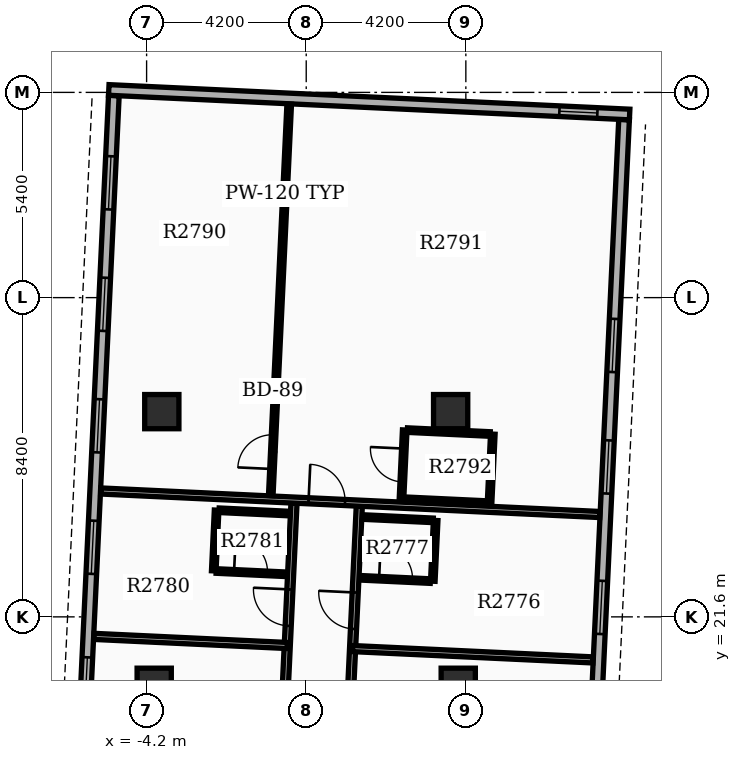
"""IFC4 building model, lengths in metres.
Left out: names, types, materials, properties, quantities, classifications, styles, units other than length and angle.
Written with IfcOpenShell. Run it as: python <this file> out.ifc"""

import sys

from ifc_helpers import new_model, si_unit, direction, frame, frame_2d, origin, origin_2d, place, context, subcontext, project, spatial, rectangle, extrude, element, fill, save


model = new_model("IFC4")
c1 = context("Model", 3, precision=1e-05, world=origin(), true_north=direction((0.0, 1.0)))
c2 = subcontext(c1, "Body", "Model", "MODEL_VIEW")
j1 = project(units=[si_unit("LENGTHUNIT", "METRE"), si_unit("PLANEANGLEUNIT", "RADIAN")], contexts=[c1])
p1 = place(None, origin())
s1 = spatial("IfcSite", under=j1, at=p1, CompositionType="ELEMENT")
p2 = place(p1, origin())
s2 = spatial("IfcBuilding", under=s1, at=p2, CompositionType="ELEMENT")
p3 = place(p2, frame((0.0, 0.0, 172.2)))
s3 = spatial("IfcBuildingStorey", under=s2, at=p3, CompositionType="ELEMENT", Elevation=172.2)
for number, where, z_axis, x_axis in (
    (1, (-4.0, 19.8, 0.0), (0.0, 0.0, 1.0), (1.0, 0.0, 0.0)),
    (2, (4.0, 19.8, 0.0), (0.0, 0.0, 1.0), (1.0, 0.0, 0.0)),
    (3, (-3.8, 27.0, 0.0), (0.0, 0.0, 1.0), (1.0, 0.0, 0.0)),
    (4, (3.8, 27.0, 0.0), (0.0, 0.0, 1.0), (1.0, 0.0, 0.0)),
):
    element("IfcColumn", number, at=place(p3, frame(where, z_axis=z_axis, x_axis=x_axis)), inside=s3, PredefinedType="COLUMN", context=c2, shape_type="SweptSolid", body=[
        extrude(rectangle(XDim=0.9, YDim=0.9, at=origin_2d()), origin(), (0.0, 0.0, 1.0), 3.9),
    ])
p4 = place(p3, frame((7.416, 14.607, 0.0), z_axis=(0.0, 0.0, 1.0), x_axis=(0.047103473814, 0.998890015344, 0.0)))
e5 = element("IfcWall", 5, at=p4, inside=s3, PredefinedType="STANDARD", context=c2, shape_type="SweptSolid", body=[
    extrude(rectangle(XDim=20.1, YDim=0.28, at=frame_2d((10.05, 0.0))), origin(), (0.0, 0.0, 1.0), 2.97),
])
p5 = place(p4, frame((1.6, 0.0, 0.8)))
e6 = element("IfcOpeningElement", 6, at=p5, cuts=e5, PredefinedType="OPENING", context=c2, shape_type="SweptSolid", body=[
    extrude(rectangle(XDim=1.4, YDim=1.6, at=frame_2d((0.7, 0.8))), frame((0.0, 0.15, 0.0), z_axis=(0.0, -1.0, 0.0), x_axis=(1.0, 0.0, 0.0)), (0.0, 0.0, 1.0), 0.3),
])
p6 = place(p4, frame((6.55, 0.0, 0.8)))
e7 = element("IfcOpeningElement", 7, at=p6, cuts=e5, PredefinedType="OPENING", context=c2, shape_type="SweptSolid", body=[
    extrude(rectangle(XDim=1.4, YDim=1.6, at=frame_2d((0.7, 0.8))), frame((0.0, 0.15, 0.0), z_axis=(0.0, -1.0, 0.0), x_axis=(1.0, 0.0, 0.0)), (0.0, 0.0, 1.0), 0.3),
])
p7 = place(p4, frame((10.25, 0.0, 0.8)))
e8 = element("IfcOpeningElement", 8, at=p7, cuts=e5, PredefinedType="OPENING", context=c2, shape_type="SweptSolid", body=[
    extrude(rectangle(XDim=1.4, YDim=1.6, at=frame_2d((0.7, 0.8))), frame((0.0, 0.15, 0.0), z_axis=(0.0, -1.0, 0.0), x_axis=(1.0, 0.0, 0.0)), (0.0, 0.0, 1.0), 0.3),
])
p8 = place(p4, frame((13.45, 0.0, 0.8)))
e9 = element("IfcOpeningElement", 9, at=p8, cuts=e5, PredefinedType="OPENING", context=c2, shape_type="SweptSolid", body=[
    extrude(rectangle(XDim=1.4, YDim=1.6, at=frame_2d((0.7, 0.8))), frame((0.0, 0.15, 0.0), z_axis=(0.0, -1.0, 0.0), x_axis=(1.0, 0.0, 0.0)), (0.0, 0.0, 1.0), 0.3),
])
p9 = place(p3, frame((-5.062, 35.318, 0.0), z_axis=(0.0, 0.0, 1.0), x_axis=(-0.047103473814, -0.998890015344, 0.0)))
e10 = element("IfcWall", 10, at=p9, inside=s3, PredefinedType="STANDARD", context=c2, shape_type="SweptSolid", body=[
    extrude(rectangle(XDim=20.1, YDim=0.28, at=frame_2d((10.05, 0.0))), origin(), (0.0, 0.0, 1.0), 2.97),
])
p10 = place(p9, frame((1.6, 0.0, 0.8)))
e11 = element("IfcOpeningElement", 11, at=p10, cuts=e10, PredefinedType="OPENING", context=c2, shape_type="SweptSolid", body=[
    extrude(rectangle(XDim=1.4, YDim=1.6, at=frame_2d((0.7, 0.8))), frame((0.0, 0.15, 0.0), z_axis=(0.0, -1.0, 0.0), x_axis=(1.0, 0.0, 0.0)), (0.0, 0.0, 1.0), 0.3),
])
p11 = place(p9, frame((4.8, 0.0, 0.8)))
e12 = element("IfcOpeningElement", 12, at=p11, cuts=e10, PredefinedType="OPENING", context=c2, shape_type="SweptSolid", body=[
    extrude(rectangle(XDim=1.4, YDim=1.6, at=frame_2d((0.7, 0.8))), frame((0.0, 0.15, 0.0), z_axis=(0.0, -1.0, 0.0), x_axis=(1.0, 0.0, 0.0)), (0.0, 0.0, 1.0), 0.3),
])
p12 = place(p9, frame((8.0, 0.0, 0.8)))
e13 = element("IfcOpeningElement", 13, at=p12, cuts=e10, PredefinedType="OPENING", context=c2, shape_type="SweptSolid", body=[
    extrude(rectangle(XDim=1.4, YDim=1.6, at=frame_2d((0.7, 0.8))), frame((0.0, 0.15, 0.0), z_axis=(0.0, -1.0, 0.0), x_axis=(1.0, 0.0, 0.0)), (0.0, 0.0, 1.0), 0.3),
])
p13 = place(p9, frame((11.2, 0.0, 0.8)))
e14 = element("IfcOpeningElement", 14, at=p13, cuts=e10, PredefinedType="OPENING", context=c2, shape_type="SweptSolid", body=[
    extrude(rectangle(XDim=1.4, YDim=1.6, at=frame_2d((0.7, 0.8))), frame((0.0, 0.15, 0.0), z_axis=(0.0, -1.0, 0.0), x_axis=(1.0, 0.0, 0.0)), (0.0, 0.0, 1.0), 0.3),
])
p14 = place(p9, frame((14.799, 0.0, 0.85)))
e15 = element("IfcOpeningElement", 15, at=p14, cuts=e10, PredefinedType="OPENING", context=c2, shape_type="SweptSolid", body=[
    extrude(rectangle(XDim=1.2, YDim=1.6, at=frame_2d((0.6, 0.8))), frame((0.0, 0.15, 0.0), z_axis=(0.0, -1.0, 0.0), x_axis=(1.0, 0.0, 0.0)), (0.0, 0.0, 1.0), 0.3),
])
p15 = place(p3, frame((8.51, 34.818, 0.0), z_axis=(0.0, 0.0, 1.0), x_axis=(-0.998890092147, 0.047101845086, 0.0)))
e16 = element("IfcWall", 16, at=p15, inside=s3, PredefinedType="STANDARD", context=c2, shape_type="SweptSolid", body=[
    extrude(rectangle(XDim=13.72, YDim=0.28, at=frame_2d((6.86, 0.0))), origin(), (0.0, 0.0, 1.0), 2.97),
])
p16 = place(p15, frame((0.85, 0.0, 0.85)))
e17 = element("IfcOpeningElement", 17, at=p16, cuts=e16, PredefinedType="OPENING", context=c2, shape_type="SweptSolid", body=[
    extrude(rectangle(XDim=1.0, YDim=1.5, at=frame_2d((0.5, 0.75))), frame((0.0, 0.15, 0.0), z_axis=(0.0, -1.0, 0.0), x_axis=(1.0, 0.0, 0.0)), (0.0, 0.0, 1.0), 0.3),
])
p17 = place(p3, frame((0.939, 14.822, 0.0), z_axis=(0.0, 0.0, 1.0), x_axis=(0.047116711769, 0.99888939101, 0.0)))
e18 = element("IfcWall", 18, at=p17, inside=s3, PredefinedType="PARTITIONING", context=c2, shape_type="SweptSolid", body=[
    extrude(rectangle(XDim=9.7, YDim=0.16, at=frame_2d((4.85, 0.0))), origin(), (0.0, 0.0, 1.0), 2.96),
])
p18 = place(p17, frame((2.575, 0.0, 0.0)))
e19 = element("IfcOpeningElement", 19, at=p18, cuts=e18, PredefinedType="OPENING", context=c2, shape_type="SweptSolid", body=[
    extrude(rectangle(XDim=0.96, YDim=2.15, at=frame_2d((0.48, 1.075))), frame((0.0, 0.09, 0.0), z_axis=(0.0, -1.0, 0.0), x_axis=(1.0, 0.0, 0.0)), (0.0, 0.0, 1.0), 0.18),
])
p19 = place(p17, frame((6.467, 0.0, 0.0)))
e20 = element("IfcOpeningElement", 20, at=p19, cuts=e18, PredefinedType="OPENING", context=c2, shape_type="SweptSolid", body=[
    extrude(rectangle(XDim=0.96, YDim=2.15, at=frame_2d((0.48, 1.075))), frame((0.0, 0.09, 0.0), z_axis=(0.0, -1.0, 0.0), x_axis=(1.0, 0.0, 0.0)), (0.0, 0.0, 1.0), 0.18),
])
p20 = place(p3, frame((1.219, 20.766, 0.0), z_axis=(0.0, 0.0, 1.0), x_axis=(0.998889408842, -0.047116333717, 0.0)))
e21 = element("IfcWall", 21, at=p20, inside=s3, PredefinedType="PARTITIONING", context=c2, shape_type="SweptSolid", body=[
    extrude(rectangle(XDim=6.332, YDim=0.16, at=frame_2d((3.166, 0.0))), origin(), (0.0, 0.0, 1.0), 2.96),
])
p21 = place(p3, frame((1.448, 22.627, 0.0), z_axis=(0.0, 0.0, 1.0), x_axis=(0.998890786574, -0.047087116047, 0.0)))
e22 = element("IfcWall", 22, at=p21, inside=s3, PredefinedType="PARTITIONING", context=c2, shape_type="SweptSolid", body=[
    extrude(rectangle(XDim=1.82, YDim=0.12, at=frame_2d((0.91, 0.0))), origin(), (0.0, 0.0, 1.0), 2.96),
])
p22 = place(p21, frame((0.47, 0.0, 0.0)))
e23 = element("IfcOpeningElement", 23, at=p22, cuts=e22, PredefinedType="OPENING", context=c2, shape_type="SweptSolid", body=[
    extrude(rectangle(XDim=0.88, YDim=2.1, at=frame_2d((0.44, 1.05))), frame((0.0, 0.07, 0.0), z_axis=(0.0, -1.0, 0.0), x_axis=(1.0, 0.0, 0.0)), (0.0, 0.0, 1.0), 0.14),
])
p23 = place(p3, frame((1.523, 24.225, 0.0), z_axis=(0.0, 0.0, 1.0), x_axis=(0.998890786574, -0.047087116047, 0.0)))
e24 = element("IfcWall", 24, at=p23, inside=s3, PredefinedType="PARTITIONING", context=c2, shape_type="SweptSolid", body=[
    extrude(rectangle(XDim=1.82, YDim=0.12, at=frame_2d((0.91, 0.0))), origin(), (0.0, 0.0, 1.0), 2.96),
])
p24 = place(p3, frame((3.33, 22.538, 0.0), z_axis=(0.0, 0.0, 1.0), x_axis=(0.047144709581, 0.998888069985, 0.0)))
e25 = element("IfcWall", 25, at=p24, inside=s3, PredefinedType="PARTITIONING", context=c2, shape_type="SweptSolid", body=[
    extrude(rectangle(XDim=1.6, YDim=0.12, at=frame_2d((0.8, 0.0))), origin(), (0.0, 0.0, 1.0), 2.96),
])
p25 = place(p3, frame((-0.779, 14.903, 0.0), z_axis=(0.0, 0.0, 1.0), x_axis=(0.047091598416, 0.998890575268, 0.0)))
e26 = element("IfcWall", 26, at=p25, inside=s3, PredefinedType="PARTITIONING", context=c2, shape_type="SweptSolid", body=[
    extrude(rectangle(XDim=9.7, YDim=0.16, at=frame_2d((4.85, 0.0))), origin(), (0.0, 0.0, 1.0), 2.96),
])
p26 = place(p25, frame((2.575, 0.0, 0.0)))
e27 = element("IfcOpeningElement", 27, at=p26, cuts=e26, PredefinedType="OPENING", context=c2, shape_type="SweptSolid", body=[
    extrude(rectangle(XDim=0.96, YDim=2.15, at=frame_2d((0.48, 1.075))), frame((0.0, 0.09, 0.0), z_axis=(0.0, -1.0, 0.0), x_axis=(1.0, 0.0, 0.0)), (0.0, 0.0, 1.0), 0.18),
])
p27 = place(p25, frame((6.467, 0.0, 0.0)))
e28 = element("IfcOpeningElement", 28, at=p27, cuts=e26, PredefinedType="OPENING", context=c2, shape_type="SweptSolid", body=[
    extrude(rectangle(XDim=0.96, YDim=2.15, at=frame_2d((0.48, 1.075))), frame((0.0, 0.09, 0.0), z_axis=(0.0, -1.0, 0.0), x_axis=(1.0, 0.0, 0.0)), (0.0, 0.0, 1.0), 0.18),
])
p28 = place(p3, frame((-0.499, 20.847, 0.0), z_axis=(0.0, 0.0, 1.0), x_axis=(-0.998891017342, 0.047082220362, 0.0)))
e29 = element("IfcWall", 29, at=p28, inside=s3, PredefinedType="PARTITIONING", context=c2, shape_type="SweptSolid", body=[
    extrude(rectangle(XDim=5.092, YDim=0.16, at=frame_2d((2.546, 0.0))), origin(), (0.0, 0.0, 1.0), 2.96),
])
p29 = place(p3, frame((-2.368, 22.807, 0.0), z_axis=(0.0, 0.0, 1.0), x_axis=(0.998891083954, -0.047080807099, 0.0)))
e30 = element("IfcWall", 30, at=p29, inside=s3, PredefinedType="PARTITIONING", context=c2, shape_type="SweptSolid", body=[
    extrude(rectangle(XDim=1.82, YDim=0.12, at=frame_2d((0.91, 0.0))), origin(), (0.0, 0.0, 1.0), 2.96),
])
p30 = place(p29, frame((0.47, 0.0, 0.0)))
e31 = element("IfcOpeningElement", 31, at=p30, cuts=e30, PredefinedType="OPENING", context=c2, shape_type="SweptSolid", body=[
    extrude(rectangle(XDim=0.88, YDim=2.1, at=frame_2d((0.44, 1.05))), frame((0.0, 0.07, 0.0), z_axis=(0.0, -1.0, 0.0), x_axis=(1.0, 0.0, 0.0)), (0.0, 0.0, 1.0), 0.14),
])
p31 = place(p3, frame((-2.293, 24.405, 0.0), z_axis=(0.0, 0.0, 1.0), x_axis=(0.998891083954, -0.047080807099, 0.0)))
e32 = element("IfcWall", 32, at=p31, inside=s3, PredefinedType="PARTITIONING", context=c2, shape_type="SweptSolid", body=[
    extrude(rectangle(XDim=1.82, YDim=0.12, at=frame_2d((0.91, 0.0))), origin(), (0.0, 0.0, 1.0), 2.96),
])
p32 = place(p3, frame((-2.433, 22.81, 0.0), z_axis=(0.0, 0.0, 1.0), x_axis=(0.046992475174, 0.998895243395, 0.0)))
e33 = element("IfcWall", 33, at=p32, inside=s3, PredefinedType="PARTITIONING", context=c2, shape_type="SweptSolid", body=[
    extrude(rectangle(XDim=1.6, YDim=0.12, at=frame_2d((0.8, 0.0))), origin(), (0.0, 0.0, 1.0), 2.96),
])
p33 = place(p3, frame((-5.405, 24.912, 0.0), z_axis=(0.0, 0.0, 1.0), x_axis=(0.998889967692, -0.047104484326, 0.0)))
e34 = element("IfcWall", 34, at=p33, inside=s3, PredefinedType="PARTITIONING", context=c2, shape_type="SweptSolid", body=[
    extrude(rectangle(XDim=13.144, YDim=0.16, at=frame_2d((6.572, 0.0))), origin(), (0.0, 0.0, 1.0), 2.96),
])
p34 = place(p33, frame((5.472, 0.0, 0.0)))
e35 = element("IfcOpeningElement", 35, at=p34, cuts=e34, PredefinedType="OPENING", context=c2, shape_type="SweptSolid", body=[
    extrude(rectangle(XDim=0.96, YDim=2.15, at=frame_2d((0.48, 1.075))), frame((0.0, 0.09, 0.0), z_axis=(0.0, -1.0, 0.0), x_axis=(1.0, 0.0, 0.0)), (0.0, 0.0, 1.0), 0.18),
])
p35 = place(p3, frame((-0.933, 24.792, 0.0), z_axis=(0.0, 0.0, 1.0), x_axis=(0.047090456762, 0.998890629089, 0.0)))
e36 = element("IfcWall", 36, at=p35, inside=s3, PredefinedType="PARTITIONING", context=c2, shape_type="SweptSolid", body=[
    extrude(rectangle(XDim=10.312, YDim=0.12, at=frame_2d((5.156, 0.0))), origin(), (0.0, 0.0, 1.0), 2.96),
])
p36 = place(p35, frame((0.7, 0.0, 0.0)))
e37 = element("IfcOpeningElement", 37, at=p36, cuts=e36, PredefinedType="OPENING", context=c2, shape_type="SweptSolid", body=[
    extrude(rectangle(XDim=0.9, YDim=2.1, at=frame_2d((0.45, 1.05))), frame((0.0, 0.07, 0.0), z_axis=(0.0, -1.0, 0.0), x_axis=(1.0, 0.0, 0.0)), (0.0, 0.0, 1.0), 0.14),
])
p37 = place(p3, frame((2.506, 24.699, 0.0), z_axis=(0.0, 0.0, 1.0), x_axis=(0.047087116047, 0.998890786574, 0.0)))
e38 = element("IfcWall", 38, at=p37, inside=s3, PredefinedType="PARTITIONING", context=c2, shape_type="SweptSolid", body=[
    extrude(rectangle(XDim=1.82, YDim=0.12, at=frame_2d((0.91, 0.0))), origin(), (0.0, 0.0, 1.0), 2.96),
])
p38 = place(p37, frame((0.45, 0.0, 0.0)))
e39 = element("IfcOpeningElement", 39, at=p38, cuts=e38, PredefinedType="OPENING", context=c2, shape_type="SweptSolid", body=[
    extrude(rectangle(XDim=0.88, YDim=2.1, at=frame_2d((0.44, 1.05))), frame((0.0, 0.07, 0.0), z_axis=(0.0, -1.0, 0.0), x_axis=(1.0, 0.0, 0.0)), (0.0, 0.0, 1.0), 0.14),
])
p39 = place(p3, frame((4.824, 24.59, 0.0), z_axis=(0.0, 0.0, 1.0), x_axis=(0.047087116047, 0.998890786574, 0.0)))
e40 = element("IfcWall", 40, at=p39, inside=s3, PredefinedType="PARTITIONING", context=c2, shape_type="SweptSolid", body=[
    extrude(rectangle(XDim=1.82, YDim=0.12, at=frame_2d((0.91, 0.0))), origin(), (0.0, 0.0, 1.0), 2.96),
])
for number, where, z_axis, x_axis in (
    (41, (2.576, 24.696, 0.0), (0.0, 0.0, 1.0), (0.999, -0.047, 0.0)),
    (42, (2.662, 26.514, 0.0), (0.0, 0.0, 1.0), (0.999, -0.047, 0.0)),
):
    element("IfcWall", number, at=place(p3, frame(where, z_axis=z_axis, x_axis=x_axis)), inside=s3, PredefinedType="PARTITIONING", context=c2, shape_type="SweptSolid", body=[
        extrude(rectangle(XDim=2.18, YDim=0.12, at=frame_2d((1.09, 0.0))), origin(), (0.0, 0.0, 1.0), 2.96),
    ])
p40 = place(p6, origin())
e43 = element("IfcWindow", 43, at=p40, inside=s3, PartitioningType="SINGLE_PANEL", PredefinedType="WINDOW", context=c2, shape_type="SweptSolid", body=[
    extrude(rectangle(XDim=1.4, YDim=1.6, at=frame_2d((0.7, 0.8))), frame((0.0, 0.03, 0.0), z_axis=(0.0, -1.0, 0.0), x_axis=(1.0, 0.0, 0.0)), (0.0, 0.0, 1.0), 0.06),
])
fill(e7, e43)
p41 = place(p7, origin())
e44 = element("IfcWindow", 44, at=p41, inside=s3, PartitioningType="SINGLE_PANEL", PredefinedType="WINDOW", context=c2, shape_type="SweptSolid", body=[
    extrude(rectangle(XDim=1.4, YDim=1.6, at=frame_2d((0.7, 0.8))), frame((0.0, 0.03, 0.0), z_axis=(0.0, -1.0, 0.0), x_axis=(1.0, 0.0, 0.0)), (0.0, 0.0, 1.0), 0.06),
])
fill(e8, e44)
p42 = place(p8, origin())
e45 = element("IfcWindow", 45, at=p42, inside=s3, PartitioningType="SINGLE_PANEL", PredefinedType="WINDOW", context=c2, shape_type="SweptSolid", body=[
    extrude(rectangle(XDim=1.4, YDim=1.6, at=frame_2d((0.7, 0.8))), frame((0.0, 0.03, 0.0), z_axis=(0.0, -1.0, 0.0), x_axis=(1.0, 0.0, 0.0)), (0.0, 0.0, 1.0), 0.06),
])
fill(e9, e45)
p43 = place(p10, origin())
e46 = element("IfcWindow", 46, at=p43, inside=s3, PartitioningType="SINGLE_PANEL", PredefinedType="WINDOW", context=c2, shape_type="SweptSolid", body=[
    extrude(rectangle(XDim=1.4, YDim=1.6, at=frame_2d((0.7, 0.8))), frame((0.0, 0.03, 0.0), z_axis=(0.0, -1.0, 0.0), x_axis=(1.0, 0.0, 0.0)), (0.0, 0.0, 1.0), 0.06),
])
fill(e11, e46)
p44 = place(p11, origin())
e47 = element("IfcWindow", 47, at=p44, inside=s3, PartitioningType="SINGLE_PANEL", PredefinedType="WINDOW", context=c2, shape_type="SweptSolid", body=[
    extrude(rectangle(XDim=1.4, YDim=1.6, at=frame_2d((0.7, 0.8))), frame((0.0, 0.03, 0.0), z_axis=(0.0, -1.0, 0.0), x_axis=(1.0, 0.0, 0.0)), (0.0, 0.0, 1.0), 0.06),
])
fill(e12, e47)
p45 = place(p12, origin())
e48 = element("IfcWindow", 48, at=p45, inside=s3, PartitioningType="SINGLE_PANEL", PredefinedType="WINDOW", context=c2, shape_type="SweptSolid", body=[
    extrude(rectangle(XDim=1.4, YDim=1.6, at=frame_2d((0.7, 0.8))), frame((0.0, 0.03, 0.0), z_axis=(0.0, -1.0, 0.0), x_axis=(1.0, 0.0, 0.0)), (0.0, 0.0, 1.0), 0.06),
])
fill(e13, e48)
p46 = place(p13, origin())
e49 = element("IfcWindow", 49, at=p46, inside=s3, PartitioningType="SINGLE_PANEL", PredefinedType="WINDOW", context=c2, shape_type="SweptSolid", body=[
    extrude(rectangle(XDim=1.4, YDim=1.6, at=frame_2d((0.7, 0.8))), frame((0.0, 0.03, 0.0), z_axis=(0.0, -1.0, 0.0), x_axis=(1.0, 0.0, 0.0)), (0.0, 0.0, 1.0), 0.06),
])
fill(e14, e49)
p47 = place(p16, origin())
e50 = element("IfcWindow", 50, at=p47, inside=s3, PartitioningType="SINGLE_PANEL", PredefinedType="WINDOW", context=c2, shape_type="SweptSolid", body=[
    extrude(rectangle(XDim=1.0, YDim=1.5, at=frame_2d((0.5, 0.75))), frame((0.0, 0.03, 0.0), z_axis=(0.0, -1.0, 0.0), x_axis=(1.0, 0.0, 0.0)), (0.0, 0.0, 1.0), 0.06),
])
fill(e17, e50)
p48 = place(p14, origin())
e51 = element("IfcWindow", 51, at=p48, inside=s3, PartitioningType="SINGLE_PANEL", PredefinedType="WINDOW", context=c2, shape_type="SweptSolid", body=[
    extrude(rectangle(XDim=1.2, YDim=1.6, at=frame_2d((0.6, 0.8))), frame((0.0, 0.03, 0.0), z_axis=(0.0, -1.0, 0.0), x_axis=(1.0, 0.0, 0.0)), (0.0, 0.0, 1.0), 0.06),
])
fill(e15, e51)
p49 = place(p19, origin())
e52 = element("IfcDoor", 52, at=p49, inside=s3, OperationType="SINGLE_SWING_RIGHT", PredefinedType="DOOR", context=c2, shape_type="SweptSolid", body=[
    extrude(rectangle(XDim=0.96, YDim=2.15, at=frame_2d((0.48, 1.075))), frame((0.0, 0.025, 0.0), z_axis=(0.0, -1.0, 0.0), x_axis=(1.0, 0.0, 0.0)), (0.0, 0.0, 1.0), 0.05),
])
fill(e20, e52)
p50 = place(p22, origin())
e53 = element("IfcDoor", 53, at=p50, inside=s3, OperationType="SINGLE_SWING_LEFT", PredefinedType="DOOR", context=c2, shape_type="SweptSolid", body=[
    extrude(rectangle(XDim=0.88, YDim=2.1, at=frame_2d((0.44, 1.05))), frame((0.0, 0.025, 0.0), z_axis=(0.0, -1.0, 0.0), x_axis=(1.0, 0.0, 0.0)), (0.0, 0.0, 1.0), 0.05),
])
fill(e23, e53)
p51 = place(p27, origin())
e54 = element("IfcDoor", 54, at=p51, inside=s3, OperationType="SINGLE_SWING_RIGHT", PredefinedType="DOOR", context=c2, shape_type="SweptSolid", body=[
    extrude(rectangle(XDim=0.96, YDim=2.15, at=frame_2d((0.48, 1.075))), frame((0.0, 0.025, 0.0), z_axis=(0.0, -1.0, 0.0), x_axis=(1.0, 0.0, 0.0)), (0.0, 0.0, 1.0), 0.05),
])
fill(e28, e54)
p52 = place(p30, origin())
e55 = element("IfcDoor", 55, at=p52, inside=s3, OperationType="SINGLE_SWING_LEFT", PredefinedType="DOOR", context=c2, shape_type="SweptSolid", body=[
    extrude(rectangle(XDim=0.88, YDim=2.1, at=frame_2d((0.44, 1.05))), frame((0.0, 0.025, 0.0), z_axis=(0.0, -1.0, 0.0), x_axis=(1.0, 0.0, 0.0)), (0.0, 0.0, 1.0), 0.05),
])
fill(e31, e55)
p53 = place(p34, origin())
e56 = element("IfcDoor", 56, at=p53, inside=s3, OperationType="SINGLE_SWING_LEFT", PredefinedType="DOOR", context=c2, shape_type="SweptSolid", body=[
    extrude(rectangle(XDim=0.96, YDim=2.15, at=frame_2d((0.48, 1.075))), frame((0.0, 0.025, 0.0), z_axis=(0.0, -1.0, 0.0), x_axis=(1.0, 0.0, 0.0)), (0.0, 0.0, 1.0), 0.05),
])
fill(e35, e56)
p54 = place(p36, origin())
e57 = element("IfcDoor", 57, at=p54, inside=s3, OperationType="SINGLE_SWING_LEFT", PredefinedType="DOOR", context=c2, shape_type="SweptSolid", body=[
    extrude(rectangle(XDim=0.9, YDim=2.1, at=frame_2d((0.45, 1.05))), frame((0.0, 0.025, 0.0), z_axis=(0.0, -1.0, 0.0), x_axis=(1.0, 0.0, 0.0)), (0.0, 0.0, 1.0), 0.05),
])
fill(e37, e57)
p55 = place(p38, origin())
e58 = element("IfcDoor", 58, at=p55, inside=s3, OperationType="SINGLE_SWING_RIGHT", PredefinedType="DOOR", context=c2, shape_type="SweptSolid", body=[
    extrude(rectangle(XDim=0.88, YDim=2.1, at=frame_2d((0.44, 1.05))), frame((0.0, 0.025, 0.0), z_axis=(0.0, -1.0, 0.0), x_axis=(1.0, 0.0, 0.0)), (0.0, 0.0, 1.0), 0.05),
])
fill(e39, e58)
save(model, sys.argv[1])
